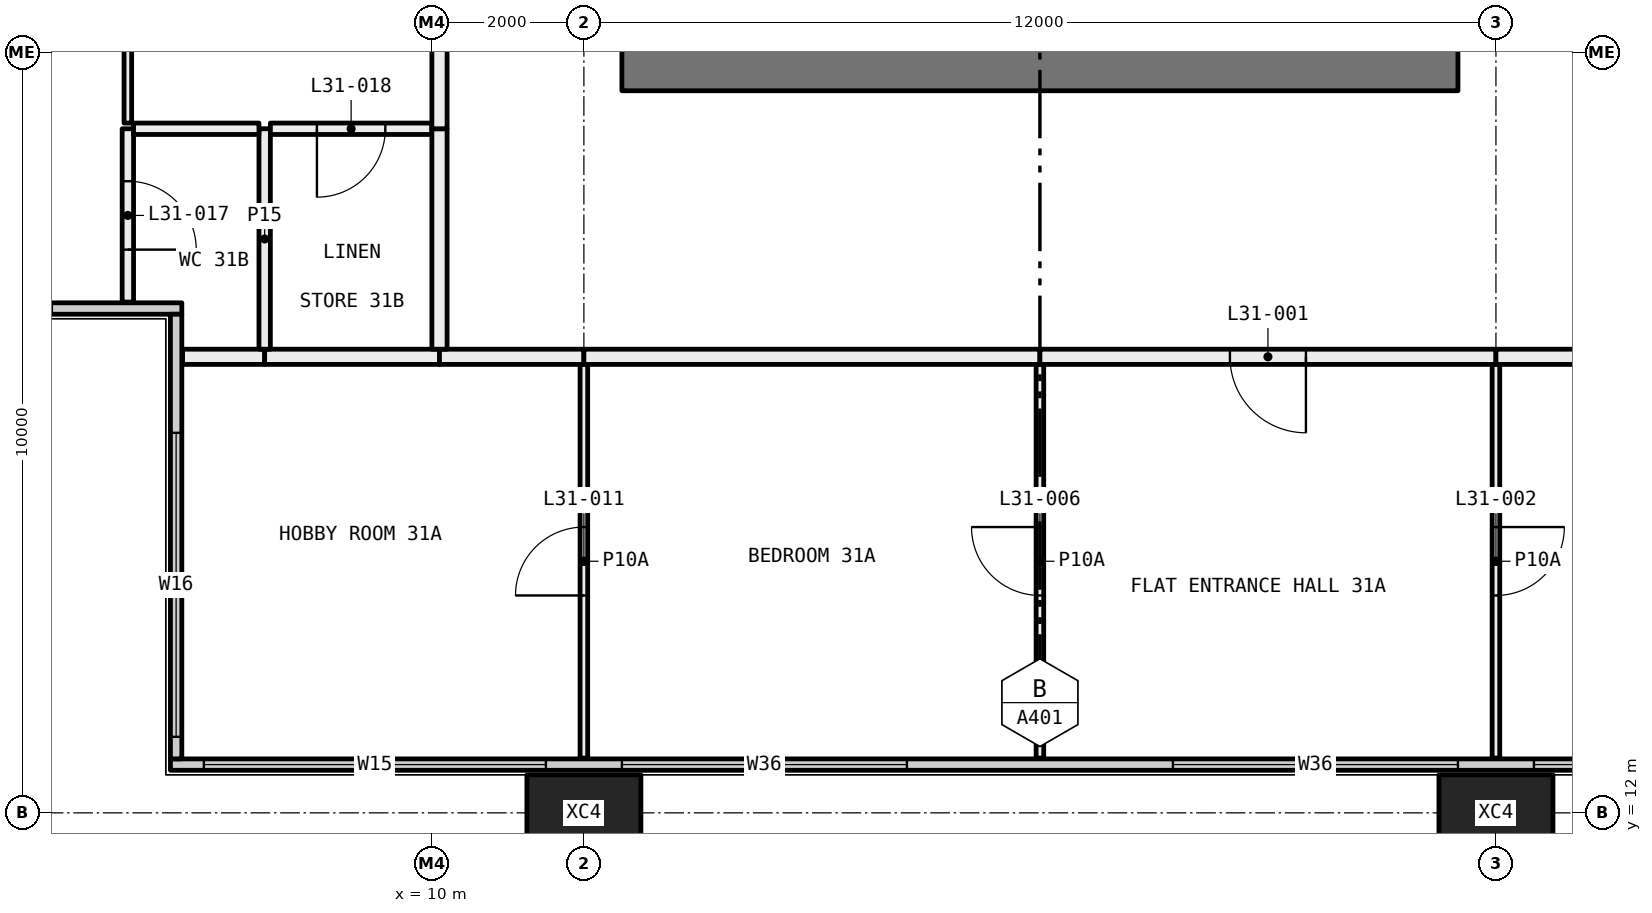
"""IFC4 building model, lengths in metres.
Left out: names, types, materials, properties, quantities, classifications, styles, units other than length and angle.
Written with IfcOpenShell. Run it as: python <this file> out.ifc"""

import sys

from ifc_helpers import new_model, si_unit, direction, frame, frame_2d, origin, origin_2d, place, context, subcontext, project, spatial, rectangle, hollow_rectangle, extrude, element, fill, save


model = new_model("IFC4")
c1 = context("Model", 3, precision=1e-05, world=origin(), true_north=direction((0.0, 1.0)))
c2 = subcontext(c1, "Body", "Model", "MODEL_VIEW")
j1 = project(units=[si_unit("LENGTHUNIT", "METRE"), si_unit("PLANEANGLEUNIT", "RADIAN")], contexts=[c1])
p1 = place(None, origin())
s1 = spatial("IfcSite", under=j1, at=p1, CompositionType="ELEMENT")
p2 = place(p1, origin())
s2 = spatial("IfcBuilding", under=s1, at=p2, CompositionType="ELEMENT")
p3 = place(p2, frame((0.0, 0.0, 120.75)))
s3 = spatial("IfcBuildingStorey", under=s2, at=p3, CompositionType="ELEMENT", Elevation=120.75)
for number, where, z_axis, x_axis in (
    (1, (12.0, 12.0, -0.4), (0.0, 0.0, 1.0), (1.0, 0.0, 0.0)),
    (2, (24.0, 12.0, -0.4), (0.0, 0.0, 1.0), (1.0, 0.0, 0.0)),
):
    element("IfcColumn", number, at=place(p3, frame(where, z_axis=z_axis, x_axis=x_axis)), inside=s3, PredefinedType="COLUMN", context=c2, shape_type="SweptSolid", body=[
        extrude(hollow_rectangle(XDim=1.5, YDim=1.0, WallThickness=0.06, at=origin_2d()), origin(), (0.0, 0.0, 1.0), 3.45),
    ])
p4 = place(p3, frame((6.56, 12.635, 0.0), z_axis=(0.0, 0.0, 1.0), x_axis=(1.0, 0.0, 0.0)))
e3 = element("IfcWall", 3, at=p4, inside=s3, PredefinedType="ELEMENTEDWALL", context=c2, shape_type="SweptSolid", body=[
    extrude(rectangle(XDim=58.88, YDim=0.15, at=frame_2d((29.44, 0.0))), origin(), (0.0, 0.0, 1.0), 3.05),
])
p5 = place(p4, frame((0.44, 0.0, 0.45)))
e4 = element("IfcOpeningElement", 4, at=p5, cuts=e3, PredefinedType="OPENING", context=c2, shape_type="SweptSolid", body=[
    extrude(rectangle(XDim=4.5, YDim=2.55, at=frame_2d((2.25, 1.275))), frame((0.0, 0.085, 0.0), z_axis=(0.0, -1.0, 0.0), x_axis=(1.0, 0.0, 0.0)), (0.0, 0.0, 1.0), 0.17),
])
p6 = place(p4, frame((5.94, 0.0, 0.45)))
e5 = element("IfcOpeningElement", 5, at=p6, cuts=e3, PredefinedType="OPENING", context=c2, shape_type="SweptSolid", body=[
    extrude(rectangle(XDim=3.75, YDim=2.55, at=frame_2d((1.875, 1.275))), frame((0.0, 0.085, 0.0), z_axis=(0.0, -1.0, 0.0), x_axis=(1.0, 0.0, 0.0)), (0.0, 0.0, 1.0), 0.17),
])
p7 = place(p4, frame((13.19, 0.0, 0.45)))
e6 = element("IfcOpeningElement", 6, at=p7, cuts=e3, PredefinedType="OPENING", context=c2, shape_type="SweptSolid", body=[
    extrude(rectangle(XDim=3.75, YDim=2.55, at=frame_2d((1.875, 1.275))), frame((0.0, 0.085, 0.0), z_axis=(0.0, -1.0, 0.0), x_axis=(1.0, 0.0, 0.0)), (0.0, 0.0, 1.0), 0.17),
])
p8 = place(p4, frame((17.94, 0.0, 0.45)))
e7 = element("IfcOpeningElement", 7, at=p8, cuts=e3, PredefinedType="OPENING", context=c2, shape_type="SweptSolid", body=[
    extrude(rectangle(XDim=3.75, YDim=2.55, at=frame_2d((1.875, 1.275))), frame((0.0, 0.085, 0.0), z_axis=(0.0, -1.0, 0.0), x_axis=(1.0, 0.0, 0.0)), (0.0, 0.0, 1.0), 0.17),
])
p9 = place(p4, frame((25.19, 0.0, 0.45)))
e8 = element("IfcOpeningElement", 8, at=p9, cuts=e3, PredefinedType="OPENING", context=c2, shape_type="SweptSolid", body=[
    extrude(rectangle(XDim=0.75, YDim=2.55, at=frame_2d((0.375, 1.275))), frame((0.0, 0.085, 0.0), z_axis=(0.0, -1.0, 0.0), x_axis=(1.0, 0.0, 0.0)), (0.0, 0.0, 1.0), 0.17),
])
p10 = place(p4, frame((26.94, 0.0, 0.45)))
e9 = element("IfcOpeningElement", 9, at=p10, cuts=e3, PredefinedType="OPENING", context=c2, shape_type="SweptSolid", body=[
    extrude(rectangle(XDim=2.0, YDim=2.55, at=frame_2d((1.0, 1.275))), frame((0.0, 0.085, 0.0), z_axis=(0.0, -1.0, 0.0), x_axis=(1.0, 0.0, 0.0)), (0.0, 0.0, 1.0), 0.17),
])
p11 = place(p4, frame((29.94, 0.0, 0.45)))
e10 = element("IfcOpeningElement", 10, at=p11, cuts=e3, PredefinedType="OPENING", context=c2, shape_type="SweptSolid", body=[
    extrude(rectangle(XDim=3.75, YDim=2.55, at=frame_2d((1.875, 1.275))), frame((0.0, 0.085, 0.0), z_axis=(0.0, -1.0, 0.0), x_axis=(1.0, 0.0, 0.0)), (0.0, 0.0, 1.0), 0.17),
])
p12 = place(p4, frame((37.19, 0.0, 0.45)))
e11 = element("IfcOpeningElement", 11, at=p12, cuts=e3, PredefinedType="OPENING", context=c2, shape_type="SweptSolid", body=[
    extrude(rectangle(XDim=3.75, YDim=2.55, at=frame_2d((1.875, 1.275))), frame((0.0, 0.085, 0.0), z_axis=(0.0, -1.0, 0.0), x_axis=(1.0, 0.0, 0.0)), (0.0, 0.0, 1.0), 0.17),
])
p13 = place(p4, frame((41.94, 0.0, 0.45)))
e12 = element("IfcOpeningElement", 12, at=p13, cuts=e3, PredefinedType="OPENING", context=c2, shape_type="SweptSolid", body=[
    extrude(rectangle(XDim=3.75, YDim=2.55, at=frame_2d((1.875, 1.275))), frame((0.0, 0.085, 0.0), z_axis=(0.0, -1.0, 0.0), x_axis=(1.0, 0.0, 0.0)), (0.0, 0.0, 1.0), 0.17),
])
p14 = place(p4, frame((49.19, 0.0, 0.45)))
e13 = element("IfcOpeningElement", 13, at=p14, cuts=e3, PredefinedType="OPENING", context=c2, shape_type="SweptSolid", body=[
    extrude(rectangle(XDim=0.75, YDim=2.55, at=frame_2d((0.375, 1.275))), frame((0.0, 0.085, 0.0), z_axis=(0.0, -1.0, 0.0), x_axis=(1.0, 0.0, 0.0)), (0.0, 0.0, 1.0), 0.17),
])
p15 = place(p4, frame((50.94, 0.0, 0.45)))
e14 = element("IfcOpeningElement", 14, at=p15, cuts=e3, PredefinedType="OPENING", context=c2, shape_type="SweptSolid", body=[
    extrude(rectangle(XDim=2.0, YDim=2.55, at=frame_2d((1.0, 1.275))), frame((0.0, 0.085, 0.0), z_axis=(0.0, -1.0, 0.0), x_axis=(1.0, 0.0, 0.0)), (0.0, 0.0, 1.0), 0.17),
])
p16 = place(p4, frame((53.94, 0.0, 0.45)))
e15 = element("IfcOpeningElement", 15, at=p16, cuts=e3, PredefinedType="OPENING", context=c2, shape_type="SweptSolid", body=[
    extrude(rectangle(XDim=4.5, YDim=2.55, at=frame_2d((2.25, 1.275))), frame((0.0, 0.085, 0.0), z_axis=(0.0, -1.0, 0.0), x_axis=(1.0, 0.0, 0.0)), (0.0, 0.0, 1.0), 0.17),
])
p17 = place(p3, frame((0.56, 18.635, 0.0), z_axis=(0.0, 0.0, 1.0), x_axis=(1.0, 0.0, 0.0)))
e16 = element("IfcWall", 16, at=p17, inside=s3, PredefinedType="ELEMENTEDWALL", context=c2, shape_type="SweptSolid", body=[
    extrude(rectangle(XDim=6.15, YDim=0.15, at=frame_2d((3.075, 0.0))), origin(), (0.0, 0.0, 1.0), 3.05),
])
p18 = place(p17, frame((0.44, 0.0, 0.45)))
e17 = element("IfcOpeningElement", 17, at=p18, cuts=e16, PredefinedType="OPENING", context=c2, shape_type="SweptSolid", body=[
    extrude(rectangle(XDim=4.0, YDim=2.55, at=frame_2d((2.0, 1.275))), frame((0.0, 0.085, 0.0), z_axis=(0.0, -1.0, 0.0), x_axis=(1.0, 0.0, 0.0)), (0.0, 0.0, 1.0), 0.17),
])
p19 = place(p3, frame((6.635, 12.71, 0.0), z_axis=(0.0, 0.0, 1.0), x_axis=(0.0, 1.0, 0.0)))
e18 = element("IfcWall", 18, at=p19, inside=s3, PredefinedType="ELEMENTEDWALL", context=c2, shape_type="SweptSolid", body=[
    extrude(rectangle(XDim=5.85, YDim=0.15, at=frame_2d((2.925, 0.0))), origin(), (0.0, 0.0, 1.0), 3.05),
])
p20 = place(p19, frame((0.29, 0.0, 0.45)))
e19 = element("IfcOpeningElement", 19, at=p20, cuts=e18, PredefinedType="OPENING", context=c2, shape_type="SweptSolid", body=[
    extrude(rectangle(XDim=4.0, YDim=2.55, at=frame_2d((2.0, 1.275))), frame((0.0, 0.085, 0.0), z_axis=(0.0, -1.0, 0.0), x_axis=(1.0, 0.0, 0.0)), (0.0, 0.0, 1.0), 0.17),
])
p21 = place(p3, frame((12.0, 12.72, 0.0), z_axis=(0.0, 0.0, 1.0), x_axis=(0.0, 1.0, 0.0)))
e20 = element("IfcWall", 20, at=p21, inside=s3, PredefinedType="PARTITIONING", context=c2, shape_type="SweptSolid", body=[
    extrude(rectangle(XDim=5.18, YDim=0.1, at=frame_2d((2.59, 0.0))), origin(), (0.0, 0.0, 1.0), 3.05),
])
p22 = place(p21, frame((2.14, 0.0, 0.0)))
e21 = element("IfcOpeningElement", 21, at=p22, cuts=e20, PredefinedType="OPENING", context=c2, shape_type="SweptSolid", body=[
    extrude(rectangle(XDim=0.9, YDim=2.1, at=frame_2d((0.45, 1.05))), frame((0.0, 0.06, 0.0), z_axis=(0.0, -1.0, 0.0), x_axis=(1.0, 0.0, 0.0)), (0.0, 0.0, 1.0), 0.12),
])
p23 = place(p3, frame((7.8, 18.0, 0.0), z_axis=(0.0, 0.0, 1.0), x_axis=(-1.0, 0.0, 0.0)))
e22 = element("IfcWall", 22, at=p23, inside=s3, PredefinedType="PARTITIONING", context=c2, shape_type="SweptSolid", body=[
    extrude(rectangle(XDim=1.08, YDim=0.2, at=frame_2d((0.54, 0.0))), origin(), (0.0, 0.0, 1.0), 3.05),
])
p24 = place(p3, frame((10.1, 18.0, 0.0), z_axis=(0.0, 0.0, 1.0), x_axis=(-1.0, 0.0, 0.0)))
e23 = element("IfcWall", 23, at=p24, inside=s3, PredefinedType="PARTITIONING", context=c2, shape_type="SweptSolid", body=[
    extrude(rectangle(XDim=2.3, YDim=0.2, at=frame_2d((1.15, 0.0))), origin(), (0.0, 0.0, 1.0), 3.05),
])
p25 = place(p3, frame((12.0, 18.0, 0.0), z_axis=(0.0, 0.0, 1.0), x_axis=(-1.0, 0.0, 0.0)))
e24 = element("IfcWall", 24, at=p25, inside=s3, PredefinedType="PARTITIONING", context=c2, shape_type="SweptSolid", body=[
    extrude(rectangle(XDim=1.9, YDim=0.2, at=frame_2d((0.95, 0.0))), origin(), (0.0, 0.0, 1.0), 3.05),
])
p26 = place(p3, frame((18.0, 12.72, 0.0), z_axis=(0.0, 0.0, 1.0), x_axis=(0.0, 1.0, 0.0)))
e25 = element("IfcWall", 25, at=p26, inside=s3, PredefinedType="PARTITIONING", context=c2, shape_type="SweptSolid", body=[
    extrude(rectangle(XDim=5.18, YDim=0.1, at=frame_2d((2.59, 0.0))), origin(), (0.0, 0.0, 1.0), 3.05),
])
p27 = place(p26, frame((2.14, 0.0, 0.0)))
e26 = element("IfcOpeningElement", 26, at=p27, cuts=e25, PredefinedType="OPENING", context=c2, shape_type="SweptSolid", body=[
    extrude(rectangle(XDim=0.9, YDim=2.1, at=frame_2d((0.45, 1.05))), frame((0.0, 0.06, 0.0), z_axis=(0.0, -1.0, 0.0), x_axis=(1.0, 0.0, 0.0)), (0.0, 0.0, 1.0), 0.12),
])
p28 = place(p3, frame((18.0, 18.0, 0.0), z_axis=(0.0, 0.0, 1.0), x_axis=(-1.0, 0.0, 0.0)))
e27 = element("IfcWall", 27, at=p28, inside=s3, PredefinedType="PARTITIONING", context=c2, shape_type="SweptSolid", body=[
    extrude(rectangle(XDim=6.0, YDim=0.2, at=frame_2d((3.0, 0.0))), origin(), (0.0, 0.0, 1.0), 3.05),
])
p29 = place(p3, frame((24.0, 12.72, 0.0), z_axis=(0.0, 0.0, 1.0), x_axis=(0.0, 1.0, 0.0)))
e28 = element("IfcWall", 28, at=p29, inside=s3, PredefinedType="PARTITIONING", context=c2, shape_type="SweptSolid", body=[
    extrude(rectangle(XDim=5.18, YDim=0.1, at=frame_2d((2.59, 0.0))), origin(), (0.0, 0.0, 1.0), 3.05),
])
p30 = place(p29, frame((2.14, 0.0, 0.0)))
e29 = element("IfcOpeningElement", 29, at=p30, cuts=e28, PredefinedType="OPENING", context=c2, shape_type="SweptSolid", body=[
    extrude(rectangle(XDim=0.9, YDim=2.1, at=frame_2d((0.45, 1.05))), frame((0.0, 0.06, 0.0), z_axis=(0.0, -1.0, 0.0), x_axis=(1.0, 0.0, 0.0)), (0.0, 0.0, 1.0), 0.12),
])
p31 = place(p3, frame((24.0, 18.0, 0.0), z_axis=(0.0, 0.0, 1.0), x_axis=(-1.0, 0.0, 0.0)))
e30 = element("IfcWall", 30, at=p31, inside=s3, PredefinedType="PARTITIONING", context=c2, shape_type="SweptSolid", body=[
    extrude(rectangle(XDim=6.0, YDim=0.2, at=frame_2d((3.0, 0.0))), origin(), (0.0, 0.0, 1.0), 3.05),
])
p32 = place(p31, frame((2.5, 0.0, 0.0)))
e31 = element("IfcOpeningElement", 31, at=p32, cuts=e30, PredefinedType="OPENING", context=c2, shape_type="SweptSolid", body=[
    extrude(rectangle(XDim=1.0, YDim=2.1, at=frame_2d((0.5, 1.05))), frame((0.0, 0.11, 0.0), z_axis=(0.0, -1.0, 0.0), x_axis=(1.0, 0.0, 0.0)), (0.0, 0.0, 1.0), 0.22),
])
p33 = place(p3, frame((25.9, 18.0, 0.0), z_axis=(0.0, 0.0, 1.0), x_axis=(-1.0, 0.0, 0.0)))
e32 = element("IfcWall", 32, at=p33, inside=s3, PredefinedType="PARTITIONING", context=c2, shape_type="SweptSolid", body=[
    extrude(rectangle(XDim=1.9, YDim=0.2, at=frame_2d((0.95, 0.0))), origin(), (0.0, 0.0, 1.0), 3.05),
])
p34 = place(p3, frame((6.0, 18.72, 0.0), z_axis=(0.0, 0.0, 1.0), x_axis=(0.0, 1.0, 0.0)))
e33 = element("IfcWall", 33, at=p34, inside=s3, PredefinedType="PARTITIONING", context=c2, shape_type="SweptSolid", body=[
    extrude(rectangle(XDim=2.28, YDim=0.15, at=frame_2d((1.14, 0.0))), origin(), (0.0, 0.0, 1.0), 3.05),
])
p35 = place(p34, frame((0.69, 0.0, 0.0)))
e34 = element("IfcOpeningElement", 34, at=p35, cuts=e33, PredefinedType="OPENING", context=c2, shape_type="SweptSolid", body=[
    extrude(rectangle(XDim=0.9, YDim=2.1, at=frame_2d((0.45, 1.05))), frame((0.0, 0.085, 0.0), z_axis=(0.0, -1.0, 0.0), x_axis=(1.0, 0.0, 0.0)), (0.0, 0.0, 1.0), 0.17),
])
p36 = place(p3, frame((6.0, 21.075, 0.0), z_axis=(0.0, 0.0, 1.0), x_axis=(0.0, 1.0, 0.0)))
e35 = element("IfcWall", 35, at=p36, inside=s3, PredefinedType="PARTITIONING", context=c2, shape_type="SweptSolid", body=[
    extrude(rectangle(XDim=2.875, YDim=0.1, at=frame_2d((1.438, 0.0))), origin(), (0.0, 0.0, 1.0), 2.45),
])
p37 = place(p3, frame((7.8, 18.1, 0.0), z_axis=(0.0, 0.0, 1.0), x_axis=(0.0, 1.0, 0.0)))
e36 = element("IfcWall", 36, at=p37, inside=s3, PredefinedType="PARTITIONING", context=c2, shape_type="SweptSolid", body=[
    extrude(rectangle(XDim=2.9, YDim=0.15, at=frame_2d((1.45, 0.0))), origin(), (0.0, 0.0, 1.0), 3.05),
])
p38 = place(p3, frame((7.725, 21.0, 0.0), z_axis=(0.0, 0.0, 1.0), x_axis=(-1.0, 0.0, 0.0)))
e37 = element("IfcWall", 37, at=p38, inside=s3, PredefinedType="PARTITIONING", context=c2, shape_type="SweptSolid", body=[
    extrude(rectangle(XDim=1.65, YDim=0.15, at=frame_2d((0.825, 0.0))), origin(), (0.0, 0.0, 1.0), 3.05),
])
p39 = place(p3, frame((10.0, 21.0, 0.0), z_axis=(0.0, 0.0, 1.0), x_axis=(-1.0, 0.0, 0.0)))
e38 = element("IfcWall", 38, at=p39, inside=s3, PredefinedType="PARTITIONING", context=c2, shape_type="SweptSolid", body=[
    extrude(rectangle(XDim=2.125, YDim=0.15, at=frame_2d((1.062, 0.0))), origin(), (0.0, 0.0, 1.0), 3.05),
])
p40 = place(p39, frame((0.613, 0.0, 0.0)))
e39 = element("IfcOpeningElement", 39, at=p40, cuts=e38, PredefinedType="OPENING", context=c2, shape_type="SweptSolid", body=[
    extrude(rectangle(XDim=0.9, YDim=2.1, at=frame_2d((0.45, 1.05))), frame((0.0, 0.085, 0.0), z_axis=(0.0, -1.0, 0.0), x_axis=(1.0, 0.0, 0.0)), (0.0, 0.0, 1.0), 0.17),
])
p41 = place(p3, frame((10.1, 18.1, 0.0), z_axis=(0.0, 0.0, 1.0), x_axis=(0.0, 1.0, 0.0)))
e40 = element("IfcWall", 40, at=p41, inside=s3, PredefinedType="PARTITIONING", context=c2, shape_type="SweptSolid", body=[
    extrude(rectangle(XDim=2.9, YDim=0.2, at=frame_2d((1.45, 0.0))), origin(), (0.0, 0.0, 1.0), 3.05),
])
p42 = place(p3, frame((10.1, 21.0, 0.0), z_axis=(0.0, 0.0, 1.0), x_axis=(0.0, 1.0, 0.0)))
e41 = element("IfcWall", 41, at=p42, inside=s3, PredefinedType="PARTITIONING", context=c2, shape_type="SweptSolid", body=[
    extrude(rectangle(XDim=3.1, YDim=0.2, at=frame_2d((1.55, 0.0))), origin(), (0.0, 0.0, 1.0), 2.45),
])
p43 = place(p3, frame((12.5, 21.825, 0.0), z_axis=(0.0, 0.0, 1.0), x_axis=(1.0, 0.0, 0.0)))
e42 = element("IfcWall", 42, at=p43, inside=s3, PredefinedType="SHEAR", context=c2, shape_type="SweptSolid", body=[
    extrude(rectangle(XDim=11.0, YDim=0.65, at=frame_2d((5.5, 0.0))), origin(), (0.0, 0.0, 1.0), 3.05),
])
p44 = place(p5, origin())
e43 = element("IfcWindow", 43, at=p44, inside=s3, PartitioningType="SINGLE_PANEL", PredefinedType="WINDOW", context=c2, shape_type="SweptSolid", body=[
    extrude(rectangle(XDim=4.5, YDim=2.55, at=frame_2d((2.25, 1.275))), frame((0.0, 0.03, 0.0), z_axis=(0.0, -1.0, 0.0), x_axis=(1.0, 0.0, 0.0)), (0.0, 0.0, 1.0), 0.06),
])
fill(e4, e43)
p45 = place(p6, origin())
e44 = element("IfcWindow", 44, at=p45, inside=s3, PartitioningType="SINGLE_PANEL", PredefinedType="WINDOW", context=c2, shape_type="SweptSolid", body=[
    extrude(rectangle(XDim=3.75, YDim=2.55, at=frame_2d((1.875, 1.275))), frame((0.0, 0.03, 0.0), z_axis=(0.0, -1.0, 0.0), x_axis=(1.0, 0.0, 0.0)), (0.0, 0.0, 1.0), 0.06),
])
fill(e5, e44)
p46 = place(p7, origin())
e45 = element("IfcWindow", 45, at=p46, inside=s3, PartitioningType="SINGLE_PANEL", PredefinedType="WINDOW", context=c2, shape_type="SweptSolid", body=[
    extrude(rectangle(XDim=3.75, YDim=2.55, at=frame_2d((1.875, 1.275))), frame((0.0, 0.03, 0.0), z_axis=(0.0, -1.0, 0.0), x_axis=(1.0, 0.0, 0.0)), (0.0, 0.0, 1.0), 0.06),
])
fill(e6, e45)
p47 = place(p8, origin())
e46 = element("IfcWindow", 46, at=p47, inside=s3, PartitioningType="SINGLE_PANEL", PredefinedType="WINDOW", context=c2, shape_type="SweptSolid", body=[
    extrude(rectangle(XDim=3.75, YDim=2.55, at=frame_2d((1.875, 1.275))), frame((0.0, 0.03, 0.0), z_axis=(0.0, -1.0, 0.0), x_axis=(1.0, 0.0, 0.0)), (0.0, 0.0, 1.0), 0.06),
])
fill(e7, e46)
p48 = place(p20, origin())
e47 = element("IfcWindow", 47, at=p48, inside=s3, PartitioningType="SINGLE_PANEL", PredefinedType="WINDOW", context=c2, shape_type="SweptSolid", body=[
    extrude(rectangle(XDim=4.0, YDim=2.55, at=frame_2d((2.0, 1.275))), frame((0.0, 0.03, 0.0), z_axis=(0.0, -1.0, 0.0), x_axis=(1.0, 0.0, 0.0)), (0.0, 0.0, 1.0), 0.06),
])
fill(e19, e47)
p49 = place(p32, origin())
e48 = element("IfcDoor", 48, at=p49, inside=s3, OperationType="SINGLE_SWING_RIGHT", PredefinedType="DOOR", context=c2, shape_type="SweptSolid", body=[
    extrude(rectangle(XDim=1.0, YDim=2.1, at=frame_2d((0.5, 1.05))), frame((0.0, 0.025, 0.0), z_axis=(0.0, -1.0, 0.0), x_axis=(1.0, 0.0, 0.0)), (0.0, 0.0, 1.0), 0.05),
])
fill(e31, e48)
p50 = place(p30, frame((0.9, 0.0, 0.0), x_axis=(-1.0, 0.0, 0.0)))
e49 = element("IfcDoor", 49, at=p50, inside=s3, OperationType="SINGLE_SWING_RIGHT", PredefinedType="DOOR", context=c2, shape_type="SweptSolid", body=[
    extrude(rectangle(XDim=0.9, YDim=2.1, at=frame_2d((0.45, 1.05))), frame((0.0, 0.025, 0.0), z_axis=(0.0, -1.0, 0.0), x_axis=(1.0, 0.0, 0.0)), (0.0, 0.0, 1.0), 0.05),
])
fill(e29, e49)
p51 = place(p27, origin())
e50 = element("IfcDoor", 50, at=p51, inside=s3, OperationType="SINGLE_SWING_LEFT", PredefinedType="DOOR", context=c2, shape_type="SweptSolid", body=[
    extrude(rectangle(XDim=0.9, YDim=2.1, at=frame_2d((0.45, 1.05))), frame((0.0, 0.025, 0.0), z_axis=(0.0, -1.0, 0.0), x_axis=(1.0, 0.0, 0.0)), (0.0, 0.0, 1.0), 0.05),
])
fill(e26, e50)
p52 = place(p22, origin())
e51 = element("IfcDoor", 51, at=p52, inside=s3, OperationType="SINGLE_SWING_RIGHT", PredefinedType="DOOR", context=c2, shape_type="SweptSolid", body=[
    extrude(rectangle(XDim=0.9, YDim=2.1, at=frame_2d((0.45, 1.05))), frame((0.0, 0.025, 0.0), z_axis=(0.0, -1.0, 0.0), x_axis=(1.0, 0.0, 0.0)), (0.0, 0.0, 1.0), 0.05),
])
fill(e21, e51)
p53 = place(p35, frame((0.9, 0.0, 0.0), x_axis=(-1.0, 0.0, 0.0)))
e52 = element("IfcDoor", 52, at=p53, inside=s3, OperationType="SINGLE_SWING_LEFT", PredefinedType="DOOR", context=c2, shape_type="SweptSolid", body=[
    extrude(rectangle(XDim=0.9, YDim=2.1, at=frame_2d((0.45, 1.05))), frame((0.0, 0.025, 0.0), z_axis=(0.0, -1.0, 0.0), x_axis=(1.0, 0.0, 0.0)), (0.0, 0.0, 1.0), 0.05),
])
fill(e34, e52)
p54 = place(p40, origin())
e53 = element("IfcDoor", 53, at=p54, inside=s3, OperationType="SINGLE_SWING_LEFT", PredefinedType="DOOR", context=c2, shape_type="SweptSolid", body=[
    extrude(rectangle(XDim=0.9, YDim=2.1, at=frame_2d((0.45, 1.05))), frame((0.0, 0.025, 0.0), z_axis=(0.0, -1.0, 0.0), x_axis=(1.0, 0.0, 0.0)), (0.0, 0.0, 1.0), 0.05),
])
fill(e39, e53)
save(model, sys.argv[1])
